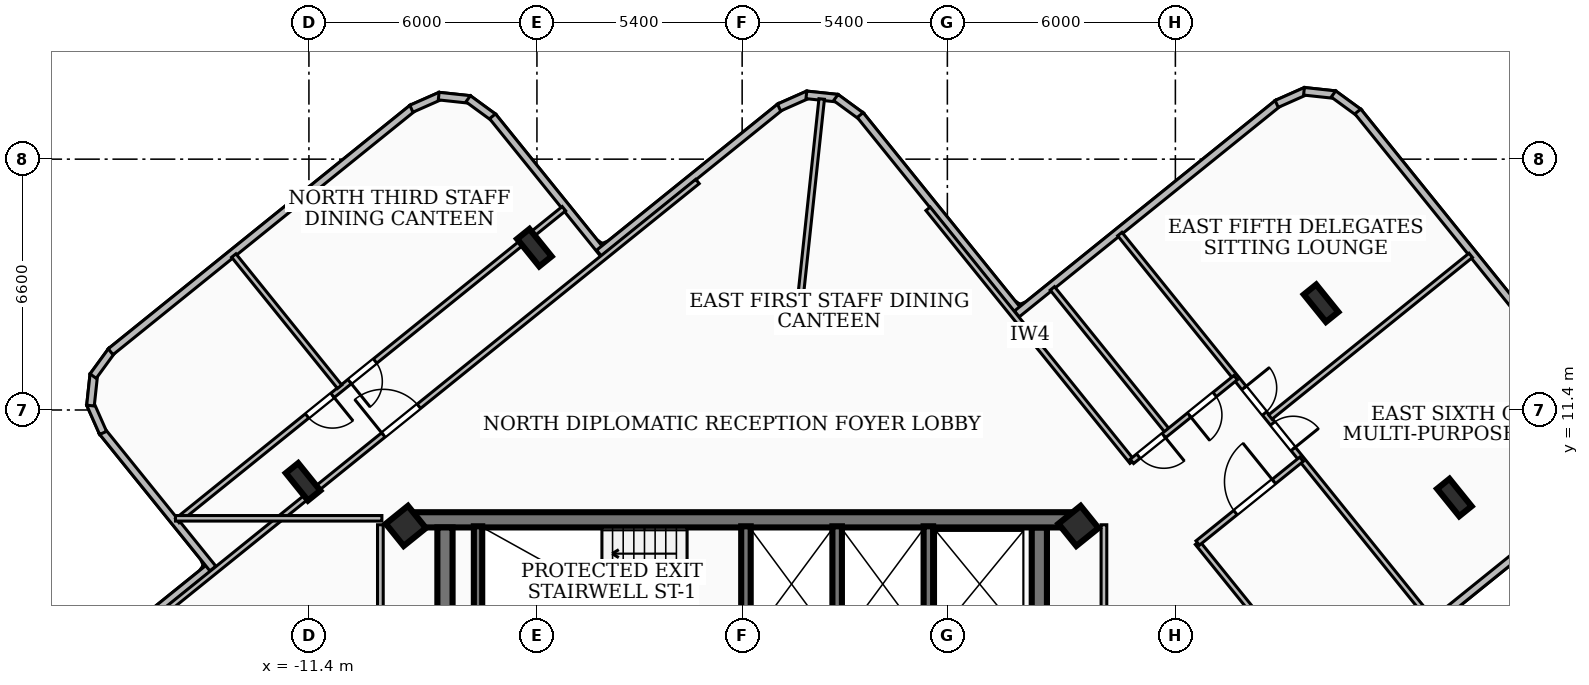
"""IFC4 building model, lengths in metres.
Left out: names, types, materials, properties, quantities, classifications, styles, units other than length and angle.
Written with IfcOpenShell. Run it as: python <this file> out.ifc"""

import sys

from ifc_helpers import new_model, si_unit, direction, frame, frame_2d, origin, origin_2d, place, context, subcontext, project, spatial, rectangle, i_section, extrude, element, fill, save


model = new_model("IFC4")
c1 = context("Model", 3, precision=1e-05, world=origin(), true_north=direction((0.0, 1.0)))
c2 = subcontext(c1, "Body", "Model", "MODEL_VIEW")
j1 = project(units=[si_unit("LENGTHUNIT", "METRE"), si_unit("PLANEANGLEUNIT", "RADIAN")], contexts=[c1])
p1 = place(None, origin())
s1 = spatial("IfcSite", under=j1, at=p1, CompositionType="ELEMENT")
p2 = place(p1, origin())
s2 = spatial("IfcBuilding", under=s1, at=p2, CompositionType="ELEMENT")
p3 = place(p2, frame((0.0, 0.0, 235.98)))
s3 = spatial("IfcBuildingStorey", under=s2, at=p3, CompositionType="ELEMENT", Elevation=235.98)
p4 = place(p3, frame((-8.78, 8.51, 0.0), z_axis=(0.0, 0.0, 1.0), x_axis=(1.0, 0.0, 0.0)))
e1 = element("IfcWall", 1, at=p4, inside=s3, PredefinedType="SHEAR", context=c2, shape_type="SweptSolid", body=[
    extrude(rectangle(XDim=17.56, YDim=0.4, at=frame_2d((8.78, 0.0))), origin(), (0.0, 0.0, 1.0), 3.02),
])
for number, where, z_axis, x_axis in (
    (2, (-7.82, 1.95, 0.0), (0.0, 0.0, 1.0), (0.0, 1.0, 0.0)),
    (3, (7.82, 8.31, 0.0), (0.0, 0.0, 1.0), (0.0, -1.0, 0.0)),
):
    element("IfcWall", number, at=place(p3, frame(where, z_axis=z_axis, x_axis=x_axis)), inside=s3, PredefinedType="SHEAR", context=c2, shape_type="SweptSolid", body=[
        extrude(rectangle(XDim=6.36, YDim=0.4, at=frame_2d((3.18, 0.0))), origin(), (0.0, 0.0, 1.0), 3.02),
    ])
p5 = place(p3, frame((-6.95, 5.28, 0.0), z_axis=(0.0, 0.0, 1.0), x_axis=(0.0, 1.0, 0.0)))
e4 = element("IfcWall", 4, at=p5, inside=s3, PredefinedType="SOLIDWALL", context=c2, shape_type="SweptSolid", body=[
    extrude(rectangle(XDim=3.06, YDim=0.22, at=frame_2d((1.53, 0.0))), origin(), (0.0, 0.0, 1.0), 3.02),
])
for number, where, z_axis, x_axis in (
    (5, (0.1, 5.3, 0.0), (0.0, 0.0, 1.0), (0.0, 1.0, 0.0)),
    (6, (2.5, 5.3, 0.0), (0.0, 0.0, 1.0), (0.0, 1.0, 0.0)),
    (7, (4.9, 5.3, 0.0), (0.0, 0.0, 1.0), (0.0, 1.0, 0.0)),
):
    element("IfcWall", number, at=place(p3, frame(where, z_axis=z_axis, x_axis=x_axis)), inside=s3, PredefinedType="SOLIDWALL", context=c2, shape_type="SweptSolid", body=[
        extrude(rectangle(XDim=3.04, YDim=0.25, at=frame_2d((1.52, 0.0))), origin(), (0.0, 0.0, 1.0), 3.02),
    ])
for number, where, z_axis, x_axis in (
    (8, (-8.85, 8.35, 0.0), (0.0, 0.0, 1.0), (0.778, 0.628, 0.0)),
    (9, (8.85, 8.35, 0.0), (0.0, 0.0, 1.0), (0.778, 0.628, 0.0)),
):
    element("IfcColumn", number, at=place(p3, frame(where, z_axis=z_axis, x_axis=x_axis)), inside=s3, PredefinedType="COLUMN", context=c2, shape_type="SweptSolid", body=[
        extrude(rectangle(XDim=0.75, YDim=0.75, at=origin_2d()), origin(), (0.0, 0.0, 1.0), 3.42),
    ])
for number, where, z_axis, x_axis in (
    (10, (18.741, 9.097, 0.0), (0.0, 0.0, 1.0), (0.778, 0.628, 0.0)),
    (11, (15.234, 14.209, 0.0), (0.0, 0.0, 1.0), (0.778, 0.628, 0.0)),
    (12, (-5.468, 15.671, 0.0), (0.0, 0.0, 1.0), (0.778, 0.628, 0.0)),
    (13, (-11.554, 9.51, 0.0), (0.0, 0.0, 1.0), (0.778, 0.628, 0.0)),
):
    element("IfcColumn", number, at=place(p3, frame(where, z_axis=z_axis, x_axis=x_axis)), inside=s3, PredefinedType="COLUMN", context=c2, shape_type="SweptSolid", body=[
        extrude(i_section(OverallWidth=0.418, OverallDepth=0.927, WebThickness=0.019, FlangeThickness=0.032, at=origin_2d()), origin(), (0.0, 0.0, 1.0), 3.42),
    ])
p6 = place(p3, frame((-19.161, 3.106, 0.0), z_axis=(0.0, 0.0, 1.0), x_axis=(0.778151520732, 0.62807659627, 0.0)))
e14 = element("IfcWall", 14, at=p6, inside=s3, PredefinedType="SOLIDWALL", context=c2, shape_type="SweptSolid", body=[
    extrude(rectangle(XDim=6.741, YDim=0.2, at=frame_2d((3.371, 0.0))), origin(), (0.0, 0.0, 1.0), 3.02),
])
p7 = place(p3, frame((-13.927, 7.228, 0.0), z_axis=(0.0, 0.0, 1.0), x_axis=(-0.628127692416, 0.778110276259, 0.0)))
e15 = element("IfcWall", 15, at=p7, inside=s3, PredefinedType="SOLIDWALL", context=c2, shape_type="SweptSolid", body=[
    extrude(rectangle(XDim=4.641, YDim=0.2, at=frame_2d((2.32, 0.0))), origin(), (0.0, 0.0, 1.0), 3.02),
])
p8 = place(p3, frame((-16.816, 10.797, 0.0), z_axis=(0.0, 0.0, 1.0), x_axis=(-0.404435765222, 0.914566406451, 0.0)))
e16 = element("IfcWall", 16, at=p8, inside=s3, PredefinedType="SOLIDWALL", context=c2, shape_type="SweptSolid", body=[
    extrude(rectangle(XDim=0.838, YDim=0.2, at=frame_2d((0.419, 0.0))), origin(), (0.0, 0.0, 1.0), 3.02),
])
p9 = place(p3, frame((-17.148, 11.516, 0.0), z_axis=(0.0, 0.0, 1.0), x_axis=(0.106595853222, 0.994302430891, 0.0)))
e17 = element("IfcWall", 17, at=p9, inside=s3, PredefinedType="SOLIDWALL", context=c2, shape_type="SweptSolid", body=[
    extrude(rectangle(XDim=0.824, YDim=0.2, at=frame_2d((0.412, 0.0))), origin(), (0.0, 0.0, 1.0), 3.02),
])
p10 = place(p3, frame((-17.078, 12.291, 0.0), z_axis=(0.0, 0.0, 1.0), x_axis=(0.589366307287, 0.807865926893, 0.0)))
e18 = element("IfcWall", 18, at=p10, inside=s3, PredefinedType="SOLIDWALL", context=c2, shape_type="SweptSolid", body=[
    extrude(rectangle(XDim=0.838, YDim=0.2, at=frame_2d((0.419, 0.0))), origin(), (0.0, 0.0, 1.0), 3.02),
])
p11 = place(p3, frame((-16.618, 12.932, 0.0), z_axis=(0.0, 0.0, 1.0), x_axis=(0.778166052264, 0.628058592095, 0.0)))
e19 = element("IfcWall", 19, at=p11, inside=s3, PredefinedType="SOLIDWALL", context=c2, shape_type="SweptSolid", body=[
    extrude(rectangle(XDim=10.224, YDim=0.2, at=frame_2d((5.112, 0.0))), origin(), (0.0, 0.0, 1.0), 3.02),
])
p12 = place(p3, frame((-8.704, 19.327, 0.0), z_axis=(0.0, 0.0, 1.0), x_axis=(0.914614013687, 0.404328091983, 0.0)))
e20 = element("IfcWall", 20, at=p12, inside=s3, PredefinedType="SOLIDWALL", context=c2, shape_type="SweptSolid", body=[
    extrude(rectangle(XDim=0.839, YDim=0.2, at=frame_2d((0.419, 0.0))), origin(), (0.0, 0.0, 1.0), 3.02),
])
p13 = place(p3, frame((-7.985, 19.659, 0.0), z_axis=(0.0, 0.0, 1.0), x_axis=(0.994305793889, -0.10656447925, 0.0)))
e21 = element("IfcWall", 21, at=p13, inside=s3, PredefinedType="SOLIDWALL", context=c2, shape_type="SweptSolid", body=[
    extrude(rectangle(XDim=0.825, YDim=0.2, at=frame_2d((0.412, 0.0))), origin(), (0.0, 0.0, 1.0), 3.02),
])
p14 = place(p3, frame((-7.21, 19.589, 0.0), z_axis=(0.0, 0.0, 1.0), x_axis=(0.807172403894, -0.590315771763, 0.0)))
e22 = element("IfcWall", 22, at=p14, inside=s3, PredefinedType="SOLIDWALL", context=c2, shape_type="SweptSolid", body=[
    extrude(rectangle(XDim=0.839, YDim=0.2, at=frame_2d((0.419, 0.0))), origin(), (0.0, 0.0, 1.0), 3.02),
])
p15 = place(p3, frame((-6.569, 19.128, 0.0), z_axis=(0.0, 0.0, 1.0), x_axis=(0.628050563363, -0.778172532193, 0.0)))
e23 = element("IfcWall", 23, at=p15, inside=s3, PredefinedType="SOLIDWALL", context=c2, shape_type="SweptSolid", body=[
    extrude(rectangle(XDim=4.641, YDim=0.2, at=frame_2d((2.321, 0.0))), origin(), (0.0, 0.0, 1.0), 3.02),
])
p16 = place(p3, frame((-3.766, 15.528, 0.0), z_axis=(0.0, 0.0, 1.0), x_axis=(0.778185518007, 0.62803447323, 0.0)))
e24 = element("IfcWall", 24, at=p16, inside=s3, PredefinedType="SOLIDWALL", context=c2, shape_type="SweptSolid", body=[
    extrude(rectangle(XDim=6.141, YDim=0.2, at=frame_2d((3.071, 0.0))), origin(), (0.0, 0.0, 1.0), 3.02),
])
p17 = place(p3, frame((0.971, 19.359, 0.0), z_axis=(0.0, 0.0, 1.0), x_axis=(0.914183108905, 0.405301422885, 0.0)))
e25 = element("IfcWall", 25, at=p17, inside=s3, PredefinedType="SOLIDWALL", context=c2, shape_type="SweptSolid", body=[
    extrude(rectangle(XDim=0.839, YDim=0.2, at=frame_2d((0.419, 0.0))), origin(), (0.0, 0.0, 1.0), 3.02),
])
p18 = place(p3, frame((1.69, 19.692, 0.0), z_axis=(0.0, 0.0, 1.0), x_axis=(0.994305793889, -0.10656447925, 0.0)))
e26 = element("IfcWall", 26, at=p18, inside=s3, PredefinedType="SOLIDWALL", context=c2, shape_type="SweptSolid", body=[
    extrude(rectangle(XDim=0.825, YDim=0.2, at=frame_2d((0.412, 0.0))), origin(), (0.0, 0.0, 1.0), 3.02),
])
p19 = place(p3, frame((2.465, 19.622, 0.0), z_axis=(0.0, 0.0, 1.0), x_axis=(0.807172403894, -0.590315771763, 0.0)))
e27 = element("IfcWall", 27, at=p19, inside=s3, PredefinedType="SOLIDWALL", context=c2, shape_type="SweptSolid", body=[
    extrude(rectangle(XDim=0.839, YDim=0.2, at=frame_2d((0.419, 0.0))), origin(), (0.0, 0.0, 1.0), 3.02),
])
p20 = place(p3, frame((3.106, 19.161, 0.0), z_axis=(0.0, 0.0, 1.0), x_axis=(0.62807659627, -0.778151520732, 0.0)))
e28 = element("IfcWall", 28, at=p20, inside=s3, PredefinedType="SOLIDWALL", context=c2, shape_type="SweptSolid", body=[
    extrude(rectangle(XDim=6.741, YDim=0.2, at=frame_2d((3.371, 0.0))), origin(), (0.0, 0.0, 1.0), 3.02),
])
p21 = place(p3, frame((7.228, 13.927, 0.0), z_axis=(0.0, 0.0, 1.0), x_axis=(0.778207970315, 0.628006651985, 0.0)))
e29 = element("IfcWall", 29, at=p21, inside=s3, PredefinedType="SOLIDWALL", context=c2, shape_type="SweptSolid", body=[
    extrude(rectangle(XDim=8.841, YDim=0.2, at=frame_2d((4.42, 0.0))), origin(), (0.0, 0.0, 1.0), 3.02),
])
p22 = place(p3, frame((14.066, 19.453, 0.0), z_axis=(0.0, 0.0, 1.0), x_axis=(0.913991623031, 0.405733056368, 0.0)))
e30 = element("IfcWall", 30, at=p22, inside=s3, PredefinedType="SOLIDWALL", context=c2, shape_type="SweptSolid", body=[
    extrude(rectangle(XDim=0.838, YDim=0.2, at=frame_2d((0.419, 0.0))), origin(), (0.0, 0.0, 1.0), 3.02),
])
p23 = place(p3, frame((14.784, 19.786, 0.0), z_axis=(0.0, 0.0, 1.0), x_axis=(0.994193378796, -0.107608203949, 0.0)))
e31 = element("IfcWall", 31, at=p23, inside=s3, PredefinedType="SOLIDWALL", context=c2, shape_type="SweptSolid", body=[
    extrude(rectangle(XDim=0.826, YDim=0.2, at=frame_2d((0.413, 0.0))), origin(), (0.0, 0.0, 1.0), 3.02),
])
p24 = place(p3, frame((15.56, 19.715, 0.0), z_axis=(0.0, 0.0, 1.0), x_axis=(0.807727216348, -0.589556395921, 0.0)))
e32 = element("IfcWall", 32, at=p24, inside=s3, PredefinedType="SOLIDWALL", context=c2, shape_type="SweptSolid", body=[
    extrude(rectangle(XDim=0.838, YDim=0.2, at=frame_2d((0.419, 0.0))), origin(), (0.0, 0.0, 1.0), 3.02),
])
p25 = place(p3, frame((16.201, 19.255, 0.0), z_axis=(0.0, 0.0, 1.0), x_axis=(0.628000746334, -0.778212736084, 0.0)))
e33 = element("IfcWall", 33, at=p25, inside=s3, PredefinedType="SOLIDWALL", context=c2, shape_type="SweptSolid", body=[
    extrude(rectangle(XDim=10.223, YDim=0.2, at=frame_2d((5.112, 0.0))), origin(), (0.0, 0.0, 1.0), 3.02),
])
p26 = place(p3, frame((22.397, 9.207, 0.0), z_axis=(0.0, 0.0, 1.0), x_axis=(-0.778197552188, -0.628019561613, 0.0)))
e34 = element("IfcWall", 34, at=p26, inside=s3, PredefinedType="SOLIDWALL", context=c2, shape_type="SweptSolid", body=[
    extrude(rectangle(XDim=8.842, YDim=0.2, at=frame_2d((4.421, 0.0))), origin(), (0.0, 0.0, 1.0), 3.02),
])
p27 = place(p3, frame((-9.52, 1.75, 0.0), z_axis=(0.0, 0.0, 1.0), x_axis=(0.0, 1.0, 0.0)))
e35 = element("IfcWall", 35, at=p27, inside=s3, PredefinedType="PARTITIONING", context=c2, shape_type="SweptSolid", body=[
    extrude(rectangle(XDim=6.63, YDim=0.15, at=frame_2d((3.315, 0.0))), origin(), (0.0, 0.0, 1.0), 1.904),
])
p28 = place(p3, frame((9.52, 1.75, 0.0), z_axis=(0.0, 0.0, 1.0), x_axis=(0.0, 1.0, 0.0)))
e36 = element("IfcWall", 36, at=p28, inside=s3, PredefinedType="PARTITIONING", context=c2, shape_type="SweptSolid", body=[
    extrude(rectangle(XDim=6.63, YDim=0.15, at=frame_2d((3.315, 0.0))), origin(), (0.0, 0.0, 1.0), 2.39),
])
p29 = place(p3, frame((-14.911, 8.55, 0.0), z_axis=(0.0, 0.0, 1.0), x_axis=(1.0, 0.0, 0.0)))
e37 = element("IfcWall", 37, at=p29, inside=s3, PredefinedType="PARTITIONING", context=c2, shape_type="SweptSolid", body=[
    extrude(rectangle(XDim=5.431, YDim=0.145, at=frame_2d((2.715, 0.0))), origin(), (0.0, 0.0, 1.0), 2.39),
])
p30 = place(p3, frame((1.447, 13.54, 0.0), z_axis=(0.0, 0.0, 1.0), x_axis=(0.106294824765, 0.994334657059, 0.0)))
e38 = element("IfcWall", 38, at=p30, inside=s3, PredefinedType="PARTITIONING", context=c2, shape_type="SweptSolid", body=[
    extrude(rectangle(XDim=6.077, YDim=0.145, at=frame_2d((3.039, 0.0))), origin(), (0.0, 0.0, 1.0), 3.02),
])
p31 = place(p3, frame((10.261, 10.04, 0.0), z_axis=(0.0, 0.0, 1.0), x_axis=(-0.627945544918, 0.778257279193, 0.0)))
e39 = element("IfcWall", 39, at=p31, inside=s3, PredefinedType="PARTITIONING", context=c2, shape_type="SweptSolid", body=[
    extrude(rectangle(XDim=8.55, YDim=0.145, at=frame_2d((4.275, 0.0))), origin(), (0.0, 0.0, 1.0), 3.02),
])
p32 = place(p3, frame((16.974, 1.721, 0.0), z_axis=(0.0, 0.0, 1.0), x_axis=(-0.62808974226, 0.778140909905, 0.0)))
e40 = element("IfcWall", 40, at=p32, inside=s3, PredefinedType="PARTITIONING", context=c2, shape_type="SweptSolid", body=[
    extrude(rectangle(XDim=7.95, YDim=0.145, at=frame_2d((3.975, 0.0))), origin(), (0.0, 0.0, 1.0), 3.02),
])
p33 = place(p3, frame((11.199, 10.836, 0.0), z_axis=(0.0, 0.0, 1.0), x_axis=(-0.627885679676, 0.778305578329, 0.0)))
e41 = element("IfcWall", 41, at=p33, inside=s3, PredefinedType="PARTITIONING", context=c2, shape_type="SweptSolid", body=[
    extrude(rectangle(XDim=4.835, YDim=0.145, at=frame_2d((2.417, 0.0))), origin(), (0.0, 0.0, 1.0), 3.02),
])
p34 = place(p3, frame((12.986, 12.252, 0.0), z_axis=(0.0, 0.0, 1.0), x_axis=(-0.778235364872, -0.627972703915, 0.0)))
e42 = element("IfcWall", 42, at=p34, inside=s3, PredefinedType="PARTITIONING", context=c2, shape_type="SweptSolid", body=[
    extrude(rectangle(XDim=3.51, YDim=0.145, at=frame_2d((1.755, 0.0))), origin(), (0.0, 0.0, 1.0), 2.39),
])
p35 = place(p34, frame((2.429, 0.0, 0.0)))
e43 = element("IfcOpeningElement", 43, at=p35, cuts=e42, PredefinedType="OPENING", context=c2, shape_type="SweptSolid", body=[
    extrude(rectangle(XDim=0.86, YDim=2.04, at=frame_2d((0.43, 1.02))), frame((0.0, 0.083, 0.0), z_axis=(0.0, -1.0, 0.0), x_axis=(1.0, 0.0, 0.0)), (0.0, 0.0, 1.0), 0.165),
])
p36 = place(p34, frame((0.709, 0.0, 0.0)))
e44 = element("IfcOpeningElement", 44, at=p36, cuts=e42, PredefinedType="OPENING", context=c2, shape_type="SweptSolid", body=[
    extrude(rectangle(XDim=0.86, YDim=2.04, at=frame_2d((0.43, 1.02))), frame((0.0, 0.083, 0.0), z_axis=(0.0, -1.0, 0.0), x_axis=(1.0, 0.0, 0.0)), (0.0, 0.0, 1.0), 0.165),
])
p37 = place(p3, frame((11.988, 7.9, 0.0), z_axis=(0.0, 0.0, 1.0), x_axis=(0.778173929493, 0.628048832064, 0.0)))
e45 = element("IfcWall", 45, at=p37, inside=s3, PredefinedType="PARTITIONING", context=c2, shape_type="SweptSolid", body=[
    extrude(rectangle(XDim=3.51, YDim=0.145, at=frame_2d((1.755, 0.0))), origin(), (0.0, 0.0, 1.0), 2.39),
])
p38 = place(p37, frame((1.275, 0.0, 0.0)))
e46 = element("IfcOpeningElement", 46, at=p38, cuts=e45, PredefinedType="OPENING", context=c2, shape_type="SweptSolid", body=[
    extrude(rectangle(XDim=1.3, YDim=2.1, at=frame_2d((0.65, 1.05))), frame((0.0, 0.083, 0.0), z_axis=(0.0, -1.0, 0.0), x_axis=(1.0, 0.0, 0.0)), (0.0, 0.0, 1.0), 0.165),
])
p39 = place(p3, frame((13.899, 11.215, 0.0), z_axis=(0.0, 0.0, 1.0), x_axis=(0.778317035858, 0.62787147705, 0.0)))
e47 = element("IfcWall", 47, at=p39, inside=s3, PredefinedType="PARTITIONING", context=c2, shape_type="SweptSolid", body=[
    extrude(rectangle(XDim=6.775, YDim=0.145, at=frame_2d((3.388, 0.0))), origin(), (0.0, 0.0, 1.0), 3.02),
])
p40 = place(p3, frame((9.938, 16.03, 0.0), z_axis=(0.0, 0.0, 1.0), x_axis=(0.62792440114, -0.778274338812, 0.0)))
e48 = element("IfcWall", 48, at=p40, inside=s3, PredefinedType="PARTITIONING", context=c2, shape_type="SweptSolid", body=[
    extrude(rectangle(XDim=13.07, YDim=0.145, at=frame_2d((6.535, 0.0))), origin(), (0.0, 0.0, 1.0), 2.39),
])
p41 = place(p40, frame((6.405, 0.0, 0.0)))
e49 = element("IfcOpeningElement", 49, at=p41, cuts=e48, PredefinedType="OPENING", context=c2, shape_type="SweptSolid", body=[
    extrude(rectangle(XDim=0.86, YDim=2.04, at=frame_2d((0.43, 1.02))), frame((0.0, 0.083, 0.0), z_axis=(0.0, -1.0, 0.0), x_axis=(1.0, 0.0, 0.0)), (0.0, 0.0, 1.0), 0.165),
])
p42 = place(p40, frame((5.205, 0.0, 0.0)))
e50 = element("IfcOpeningElement", 50, at=p42, cuts=e48, PredefinedType="OPENING", context=c2, shape_type="SweptSolid", body=[
    extrude(rectangle(XDim=0.86, YDim=2.04, at=frame_2d((0.43, 1.02))), frame((0.0, 0.083, 0.0), z_axis=(0.0, -1.0, 0.0), x_axis=(1.0, 0.0, 0.0)), (0.0, 0.0, 1.0), 0.165),
])
p43 = place(p3, frame((-17.239, 4.452, 0.0), z_axis=(0.0, 0.0, 1.0), x_axis=(0.778262183237, 0.627939466942, 0.0)))
e51 = element("IfcWall", 51, at=p43, inside=s3, PredefinedType="PARTITIONING", context=c2, shape_type="SweptSolid", body=[
    extrude(rectangle(XDim=20.641, YDim=0.145, at=frame_2d((10.32, 0.0))), origin(), (0.0, 0.0, 1.0), 2.39),
])
p44 = place(p43, frame((10.02, 0.0, 0.0)))
e52 = element("IfcOpeningElement", 52, at=p44, cuts=e51, PredefinedType="OPENING", context=c2, shape_type="SweptSolid", body=[
    extrude(rectangle(XDim=1.2, YDim=2.1, at=frame_2d((0.6, 1.05))), frame((0.0, 0.083, 0.0), z_axis=(0.0, -1.0, 0.0), x_axis=(1.0, 0.0, 0.0)), (0.0, 0.0, 1.0), 0.165),
])
p45 = place(p3, frame((-10.592, 12.012, 0.0), z_axis=(0.0, 0.0, 1.0), x_axis=(-0.627878320572, 0.778311515112, 0.0)))
e53 = element("IfcWall", 53, at=p45, inside=s3, PredefinedType="PARTITIONING", context=c2, shape_type="SweptSolid", body=[
    extrude(rectangle(XDim=4.436, YDim=0.145, at=frame_2d((2.218, 0.0))), origin(), (0.0, 0.0, 1.0), 3.02),
])
p46 = place(p3, frame((-4.69, 16.697, 0.0), z_axis=(0.0, 0.0, 1.0), x_axis=(-0.778274338812, -0.62792440114, 0.0)))
e54 = element("IfcWall", 54, at=p46, inside=s3, PredefinedType="PARTITIONING", context=c2, shape_type="SweptSolid", body=[
    extrude(rectangle(XDim=13.07, YDim=0.145, at=frame_2d((6.535, 0.0))), origin(), (0.0, 0.0, 1.0), 3.02),
])
p47 = place(p46, frame((6.385, 0.0, 0.0)))
e55 = element("IfcOpeningElement", 55, at=p47, cuts=e54, PredefinedType="OPENING", context=c2, shape_type="SweptSolid", body=[
    extrude(rectangle(XDim=0.86, YDim=2.04, at=frame_2d((0.43, 1.02))), frame((0.0, 0.083, 0.0), z_axis=(0.0, -1.0, 0.0), x_axis=(1.0, 0.0, 0.0)), (0.0, 0.0, 1.0), 0.165),
])
p48 = place(p46, frame((7.825, 0.0, 0.0)))
e56 = element("IfcOpeningElement", 56, at=p48, cuts=e54, PredefinedType="OPENING", context=c2, shape_type="SweptSolid", body=[
    extrude(rectangle(XDim=0.86, YDim=2.04, at=frame_2d((0.43, 1.02))), frame((0.0, 0.083, 0.0), z_axis=(0.0, -1.0, 0.0), x_axis=(1.0, 0.0, 0.0)), (0.0, 0.0, 1.0), 0.165),
])
p49 = place(p35, origin())
e57 = element("IfcDoor", 57, at=p49, inside=s3, OperationType="SINGLE_SWING_LEFT", PredefinedType="DOOR", context=c2, shape_type="SweptSolid", body=[
    extrude(rectangle(XDim=0.86, YDim=2.04, at=frame_2d((0.43, 1.02))), frame((0.0, 0.025, 0.0), z_axis=(0.0, -1.0, 0.0), x_axis=(1.0, 0.0, 0.0)), (0.0, 0.0, 1.0), 0.05),
])
fill(e43, e57)
p50 = place(p36, origin())
e58 = element("IfcDoor", 58, at=p50, inside=s3, OperationType="SINGLE_SWING_RIGHT", PredefinedType="DOOR", context=c2, shape_type="SweptSolid", body=[
    extrude(rectangle(XDim=0.86, YDim=2.04, at=frame_2d((0.43, 1.02))), frame((0.0, 0.025, 0.0), z_axis=(0.0, -1.0, 0.0), x_axis=(1.0, 0.0, 0.0)), (0.0, 0.0, 1.0), 0.05),
])
fill(e44, e58)
p51 = place(p38, origin())
e59 = element("IfcDoor", 59, at=p51, inside=s3, OperationType="SINGLE_SWING_RIGHT", PredefinedType="DOOR", context=c2, shape_type="SweptSolid", body=[
    extrude(rectangle(XDim=1.3, YDim=2.1, at=frame_2d((0.65, 1.05))), frame((0.0, 0.025, 0.0), z_axis=(0.0, -1.0, 0.0), x_axis=(1.0, 0.0, 0.0)), (0.0, 0.0, 1.0), 0.05),
])
fill(e46, e59)
p52 = place(p41, origin())
e60 = element("IfcDoor", 60, at=p52, inside=s3, OperationType="SINGLE_SWING_RIGHT", PredefinedType="DOOR", context=c2, shape_type="SweptSolid", body=[
    extrude(rectangle(XDim=0.86, YDim=2.04, at=frame_2d((0.43, 1.02))), frame((0.0, 0.025, 0.0), z_axis=(0.0, -1.0, 0.0), x_axis=(1.0, 0.0, 0.0)), (0.0, 0.0, 1.0), 0.05),
])
fill(e49, e60)
p53 = place(p42, origin())
e61 = element("IfcDoor", 61, at=p53, inside=s3, OperationType="SINGLE_SWING_LEFT", PredefinedType="DOOR", context=c2, shape_type="SweptSolid", body=[
    extrude(rectangle(XDim=0.86, YDim=2.04, at=frame_2d((0.43, 1.02))), frame((0.0, 0.025, 0.0), z_axis=(0.0, -1.0, 0.0), x_axis=(1.0, 0.0, 0.0)), (0.0, 0.0, 1.0), 0.05),
])
fill(e50, e61)
p54 = place(p44, origin())
e62 = element("IfcDoor", 62, at=p54, inside=s3, OperationType="SINGLE_SWING_LEFT", PredefinedType="DOOR", context=c2, shape_type="SweptSolid", body=[
    extrude(rectangle(XDim=1.2, YDim=2.1, at=frame_2d((0.6, 1.05))), frame((0.0, 0.025, 0.0), z_axis=(0.0, -1.0, 0.0), x_axis=(1.0, 0.0, 0.0)), (0.0, 0.0, 1.0), 0.05),
])
fill(e52, e62)
p55 = place(p47, origin())
e63 = element("IfcDoor", 63, at=p55, inside=s3, OperationType="SINGLE_SWING_RIGHT", PredefinedType="DOOR", context=c2, shape_type="SweptSolid", body=[
    extrude(rectangle(XDim=0.86, YDim=2.04, at=frame_2d((0.43, 1.02))), frame((0.0, 0.025, 0.0), z_axis=(0.0, -1.0, 0.0), x_axis=(1.0, 0.0, 0.0)), (0.0, 0.0, 1.0), 0.05),
])
fill(e55, e63)
p56 = place(p48, origin())
e64 = element("IfcDoor", 64, at=p56, inside=s3, OperationType="SINGLE_SWING_LEFT", PredefinedType="DOOR", context=c2, shape_type="SweptSolid", body=[
    extrude(rectangle(XDim=0.86, YDim=2.04, at=frame_2d((0.43, 1.02))), frame((0.0, 0.025, 0.0), z_axis=(0.0, -1.0, 0.0), x_axis=(1.0, 0.0, 0.0)), (0.0, 0.0, 1.0), 0.05),
])
fill(e56, e64)
save(model, sys.argv[1])
